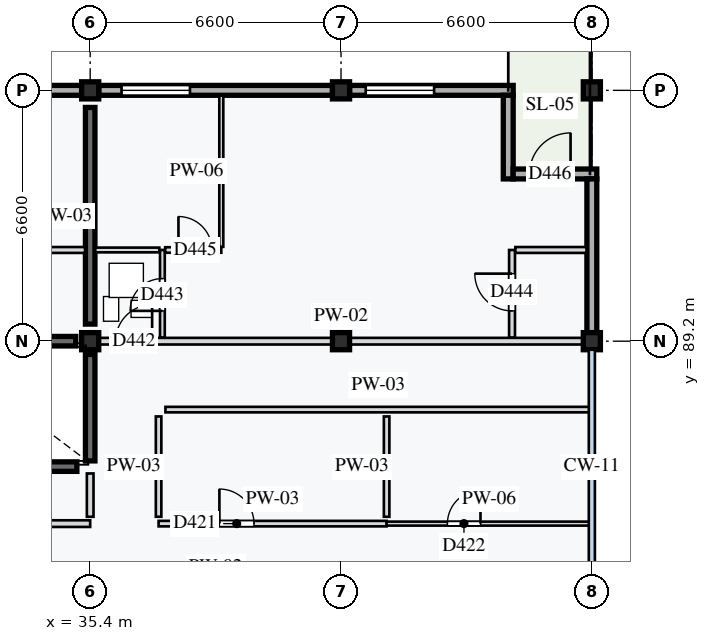
"""IFC4 building model, lengths in metres.
Left out: names, types, materials, properties, quantities, classifications, styles, units other than length and angle.
Written with IfcOpenShell. Run it as: python <this file> out.ifc"""

import sys

from ifc_helpers import new_model, si_unit, direction, frame, frame_2d, origin, origin_2d, place, context, subcontext, project, spatial, rectangle, extrude, element, fill, save


model = new_model("IFC4")
c1 = context("Model", 3, precision=1e-05, world=origin(), true_north=direction((0.0, 1.0)))
c2 = subcontext(c1, "Body", "Model", "MODEL_VIEW")
j1 = project(units=[si_unit("LENGTHUNIT", "METRE"), si_unit("PLANEANGLEUNIT", "RADIAN")], contexts=[c1])
p1 = place(None, origin())
s1 = spatial("IfcSite", under=j1, at=p1, CompositionType="ELEMENT")
p2 = place(p1, origin())
s2 = spatial("IfcBuilding", under=s1, at=p2, CompositionType="ELEMENT")
p3 = place(p2, frame((0.0, 0.0, 43.6)))
s3 = spatial("IfcBuildingStorey", under=s2, at=p3, CompositionType="ELEMENT", Elevation=43.6)
for number, where, z_axis, x_axis in (
    (1, (35.4, 89.2, 0.0), (0.0, 0.0, 1.0), (1.0, 0.0, 0.0)),
    (2, (35.4, 95.8, 0.0), (0.0, 0.0, 1.0), (1.0, 0.0, 0.0)),
    (3, (42.0, 89.2, 0.0), (0.0, 0.0, 1.0), (1.0, 0.0, 0.0)),
    (4, (42.0, 95.8, 0.0), (0.0, 0.0, 1.0), (1.0, 0.0, 0.0)),
    (5, (48.6, 89.2, 0.0), (0.0, 0.0, 1.0), (1.0, 0.0, 0.0)),
    (6, (48.6, 95.8, 0.0), (0.0, 0.0, 1.0), (1.0, 0.0, 0.0)),
):
    element("IfcColumn", number, at=place(p3, frame(where, z_axis=z_axis, x_axis=x_axis)), inside=s3, PredefinedType="COLUMN", context=c2, shape_type="SweptSolid", body=[
        extrude(rectangle(XDim=0.45, YDim=0.45, at=origin_2d()), origin(), (0.0, 0.0, 1.0), 3.2),
    ])
p4 = place(p3, frame((29.18, 89.2, 0.0), z_axis=(0.0, 0.0, 1.0), x_axis=(1.0, 0.0, 0.0)))
e7 = element("IfcWall", 7, at=p4, inside=s3, PredefinedType="SHEAR", context=c2, shape_type="SweptSolid", body=[
    extrude(rectangle(XDim=5.84, YDim=0.25, at=frame_2d((2.92, 0.0))), origin(), (0.0, 0.0, 1.0), 2.98),
])
for number, where, z_axis, x_axis in (
    (8, (32.25, 85.9, 0.0), (0.0, 0.0, 1.0), (1.0, 0.0, 0.0)),
    (9, (35.4, 86.05, 0.0), (0.0, 0.0, 1.0), (0.0, 1.0, 0.0)),
):
    element("IfcWall", number, at=place(p3, frame(where, z_axis=z_axis, x_axis=x_axis)), inside=s3, PredefinedType="SHEAR", context=c2, shape_type="SweptSolid", body=[
        extrude(rectangle(XDim=2.8, YDim=0.25, at=frame_2d((1.4, 0.0))), origin(), (0.0, 0.0, 1.0), 2.98),
    ])
p5 = place(p3, frame((35.4, 89.65, 0.0), z_axis=(0.0, 0.0, 1.0), x_axis=(0.0, 1.0, 0.0)))
e10 = element("IfcWall", 10, at=p5, inside=s3, PredefinedType="SHEAR", context=c2, shape_type="SweptSolid", body=[
    extrude(rectangle(XDim=5.7, YDim=0.25, at=frame_2d((2.85, 0.0))), origin(), (0.0, 0.0, 1.0), 2.98),
])
p6 = place(p3, frame((29.025, 95.8, 0.0), z_axis=(0.0, 0.0, 1.0), x_axis=(1.0, 0.0, 0.0)))
e11 = element("IfcWall", 11, at=p6, inside=s3, PredefinedType="STANDARD", context=c2, shape_type="SweptSolid", body=[
    extrude(rectangle(XDim=6.15, YDim=0.26, at=frame_2d((3.075, 0.0))), origin(), (0.0, 0.0, 1.0), 2.6),
])
p7 = place(p6, frame((2.321, 0.0, 0.85)))
e12 = element("IfcOpeningElement", 12, at=p7, cuts=e11, PredefinedType="OPENING", context=c2, shape_type="SweptSolid", body=[
    extrude(rectangle(XDim=2.1, YDim=1.55, at=frame_2d((1.05, 0.775))), frame((0.0, 0.14, 0.0), z_axis=(0.0, -1.0, 0.0), x_axis=(1.0, 0.0, 0.0)), (0.0, 0.0, 1.0), 0.28),
])
p8 = place(p3, frame((35.625, 95.8, 0.0), z_axis=(0.0, 0.0, 1.0), x_axis=(1.0, 0.0, 0.0)))
e13 = element("IfcWall", 13, at=p8, inside=s3, PredefinedType="STANDARD", context=c2, shape_type="SweptSolid", body=[
    extrude(rectangle(XDim=6.15, YDim=0.26, at=frame_2d((3.075, 0.0))), origin(), (0.0, 0.0, 1.0), 2.6),
])
p9 = place(p8, frame((0.6, 0.0, 0.85)))
e14 = element("IfcOpeningElement", 14, at=p9, cuts=e13, PredefinedType="OPENING", context=c2, shape_type="SweptSolid", body=[
    extrude(rectangle(XDim=1.8, YDim=1.35, at=frame_2d((0.9, 0.675))), frame((0.0, 0.14, 0.0), z_axis=(0.0, -1.0, 0.0), x_axis=(1.0, 0.0, 0.0)), (0.0, 0.0, 1.0), 0.28),
])
p10 = place(p3, frame((42.225, 95.8, 0.0), z_axis=(0.0, 0.0, 1.0), x_axis=(1.0, 0.0, 0.0)))
e15 = element("IfcWall", 15, at=p10, inside=s3, PredefinedType="STANDARD", context=c2, shape_type="SweptSolid", body=[
    extrude(rectangle(XDim=4.305, YDim=0.26, at=frame_2d((2.152, 0.0))), origin(), (0.0, 0.0, 1.0), 2.6),
])
p11 = place(p10, frame((0.425, 0.0, 0.85)))
e16 = element("IfcOpeningElement", 16, at=p11, cuts=e15, PredefinedType="OPENING", context=c2, shape_type="SweptSolid", body=[
    extrude(rectangle(XDim=1.8, YDim=1.55, at=frame_2d((0.9, 0.775))), frame((0.0, 0.14, 0.0), z_axis=(0.0, -1.0, 0.0), x_axis=(1.0, 0.0, 0.0)), (0.0, 0.0, 1.0), 0.28),
])
p12 = place(p3, frame((46.4, 95.67, 0.0), z_axis=(0.0, 0.0, 1.0), x_axis=(0.0, -1.0, 0.0)))
e17 = element("IfcWall", 17, at=p12, inside=s3, PredefinedType="STANDARD", context=c2, shape_type="SweptSolid", body=[
    extrude(rectangle(XDim=2.2, YDim=0.26, at=frame_2d((1.1, 0.0))), origin(), (0.0, 0.0, 1.0), 2.98),
])
p13 = place(p3, frame((46.53, 93.6, 0.0), z_axis=(0.0, 0.0, 1.0), x_axis=(1.0, 0.0, 0.0)))
e18 = element("IfcWall", 18, at=p13, inside=s3, PredefinedType="STANDARD", context=c2, shape_type="SweptSolid", body=[
    extrude(rectangle(XDim=2.2, YDim=0.26, at=frame_2d((1.1, 0.0))), origin(), (0.0, 0.0, 1.0), 2.98),
])
p14 = place(p13, frame((0.43, 0.0, 0.0)))
e19 = element("IfcOpeningElement", 19, at=p14, cuts=e18, PredefinedType="OPENING", context=c2, shape_type="SweptSolid", body=[
    extrude(rectangle(XDim=1.08, YDim=2.22, at=frame_2d((0.54, 1.11))), frame((0.0, 0.14, 0.0), z_axis=(0.0, -1.0, 0.0), x_axis=(1.0, 0.0, 0.0)), (0.0, 0.0, 1.0), 0.28),
])
p15 = place(p3, frame((48.6, 89.425, 0.0), z_axis=(0.0, 0.0, 1.0), x_axis=(0.0, 1.0, 0.0)))
e20 = element("IfcWall", 20, at=p15, inside=s3, PredefinedType="STANDARD", context=c2, shape_type="SweptSolid", body=[
    extrude(rectangle(XDim=4.045, YDim=0.26, at=frame_2d((2.022, 0.0))), origin(), (0.0, 0.0, 1.0), 2.65),
])
p16 = place(p3, frame((32.1, 84.4, 0.0), z_axis=(0.0, 0.0, 1.0), x_axis=(1.0, 0.0, 0.0)))
e21 = element("IfcWall", 21, at=p16, inside=s3, PredefinedType="PARTITIONING", context=c2, shape_type="SweptSolid", body=[
    extrude(rectangle(XDim=3.3, YDim=0.175, at=frame_2d((1.65, 0.0))), origin(), (0.0, 0.0, 1.0), 2.98),
])
p17 = place(p16, frame((1.1, 0.0, 0.0)))
e22 = element("IfcOpeningElement", 22, at=p17, cuts=e21, PredefinedType="OPENING", context=c2, shape_type="SweptSolid", body=[
    extrude(rectangle(XDim=0.85, YDim=2.0, at=frame_2d((0.425, 1.0))), frame((0.0, 0.097, 0.0), z_axis=(0.0, -1.0, 0.0), x_axis=(1.0, 0.0, 0.0)), (0.0, 0.0, 1.0), 0.195),
])
p18 = place(p3, frame((35.4, 84.58, 0.0), z_axis=(0.0, 0.0, 1.0), x_axis=(0.0, 1.0, 0.0)))
e23 = element("IfcWall", 23, at=p18, inside=s3, PredefinedType="PARTITIONING", context=c2, shape_type="SweptSolid", body=[
    extrude(rectangle(XDim=1.14, YDim=0.175, at=frame_2d((0.57, 0.0))), origin(), (0.0, 0.0, 1.0), 2.98),
])
p19 = place(p3, frame((37.2, 84.4, 0.0), z_axis=(0.0, 0.0, 1.0), x_axis=(1.0, 0.0, 0.0)))
e24 = element("IfcWall", 24, at=p19, inside=s3, PredefinedType="PARTITIONING", context=c2, shape_type="SweptSolid", body=[
    extrude(rectangle(XDim=6.0, YDim=0.145, at=frame_2d((3.0, 0.0))), origin(), (0.0, 0.0, 1.0), 2.98),
])
p20 = place(p19, frame((1.6, 0.0, 0.0)))
e25 = element("IfcOpeningElement", 25, at=p20, cuts=e24, PredefinedType="OPENING", context=c2, shape_type="SweptSolid", body=[
    extrude(rectangle(XDim=0.91, YDim=2.14, at=frame_2d((0.455, 1.07))), frame((0.0, 0.083, 0.0), z_axis=(0.0, -1.0, 0.0), x_axis=(1.0, 0.0, 0.0)), (0.0, 0.0, 1.0), 0.165),
])
p21 = place(p3, frame((43.2, 84.4, 0.0), z_axis=(0.0, 0.0, 1.0), x_axis=(1.0, 0.0, 0.0)))
e26 = element("IfcWall", 26, at=p21, inside=s3, PredefinedType="PARTITIONING", context=c2, shape_type="SweptSolid", body=[
    extrude(rectangle(XDim=5.4, YDim=0.105, at=frame_2d((2.7, 0.0))), origin(), (0.0, 0.0, 1.0), 2.98),
])
p22 = place(p21, frame((1.6, 0.0, 0.0)))
e27 = element("IfcOpeningElement", 27, at=p22, cuts=e26, PredefinedType="OPENING", context=c2, shape_type="SweptSolid", body=[
    extrude(rectangle(XDim=0.87, YDim=2.08, at=frame_2d((0.435, 1.04))), frame((0.0, 0.062, 0.0), z_axis=(0.0, -1.0, 0.0), x_axis=(1.0, 0.0, 0.0)), (0.0, 0.0, 1.0), 0.125),
])
p23 = place(p3, frame((43.2, 84.58, 0.0), z_axis=(0.0, 0.0, 1.0), x_axis=(0.0, 1.0, 0.0)))
e28 = element("IfcWall", 28, at=p23, inside=s3, PredefinedType="PARTITIONING", context=c2, shape_type="SweptSolid", body=[
    extrude(rectangle(XDim=2.64, YDim=0.145, at=frame_2d((1.32, 0.0))), origin(), (0.0, 0.0, 1.0), 2.98),
])
p24 = place(p3, frame((37.38, 87.4, 0.0), z_axis=(0.0, 0.0, 1.0), x_axis=(1.0, 0.0, 0.0)))
e29 = element("IfcWall", 29, at=p24, inside=s3, PredefinedType="PARTITIONING", context=c2, shape_type="SweptSolid", body=[
    extrude(rectangle(XDim=11.2, YDim=0.145, at=frame_2d((5.6, 0.0))), origin(), (0.0, 0.0, 1.0), 2.98),
])
p25 = place(p3, frame((37.2, 84.58, 0.0), z_axis=(0.0, 0.0, 1.0), x_axis=(0.0, 1.0, 0.0)))
e30 = element("IfcWall", 30, at=p25, inside=s3, PredefinedType="PARTITIONING", context=c2, shape_type="SweptSolid", body=[
    extrude(rectangle(XDim=2.64, YDim=0.145, at=frame_2d((1.32, 0.0))), origin(), (0.0, 0.0, 1.0), 2.98),
])
p26 = place(p3, frame((33.387, 91.6, 0.0), z_axis=(0.0, 0.0, 1.0), x_axis=(1.0, 0.0, 0.0)))
e31 = element("IfcWall", 31, at=p26, inside=s3, PredefinedType="PARTITIONING", context=c2, shape_type="SweptSolid", body=[
    extrude(rectangle(XDim=1.877, YDim=0.155, at=frame_2d((0.939, 0.0))), origin(), (0.0, 0.0, 1.0), 2.98),
])
p27 = place(p3, frame((35.4, 89.2, 0.0), z_axis=(0.0, 0.0, 1.0), x_axis=(1.0, 0.0, 0.0)))
e32 = element("IfcWall", 32, at=p27, inside=s3, PredefinedType="PARTITIONING", context=c2, shape_type="SweptSolid", body=[
    extrude(rectangle(XDim=13.2, YDim=0.175, at=frame_2d((6.6, 0.0))), origin(), (0.0, 0.0, 1.0), 2.7),
])
p28 = place(p27, frame((0.67, 0.0, 0.0)))
e33 = element("IfcOpeningElement", 33, at=p28, cuts=e32, PredefinedType="OPENING", context=c2, shape_type="SweptSolid", body=[
    extrude(rectangle(XDim=0.96, YDim=2.18, at=frame_2d((0.48, 1.09))), frame((0.0, 0.097, 0.0), z_axis=(0.0, -1.0, 0.0), x_axis=(1.0, 0.0, 0.0)), (0.0, 0.0, 1.0), 0.195),
])
p29 = place(p3, frame((37.3, 89.298, 0.0), z_axis=(0.0, 0.0, 1.0), x_axis=(0.0, 1.0, 0.0)))
e34 = element("IfcWall", 34, at=p29, inside=s3, PredefinedType="PARTITIONING", context=c2, shape_type="SweptSolid", body=[
    extrude(rectangle(XDim=2.302, YDim=0.125, at=frame_2d((1.151, 0.0))), origin(), (0.0, 0.0, 1.0), 2.98),
])
p30 = place(p29, frame((0.7, 0.0, 0.0)))
e35 = element("IfcOpeningElement", 35, at=p30, cuts=e34, PredefinedType="OPENING", context=c2, shape_type="SweptSolid", body=[
    extrude(rectangle(XDim=0.85, YDim=2.04, at=frame_2d((0.425, 1.02))), frame((0.0, 0.073, 0.0), z_axis=(0.0, -1.0, 0.0), x_axis=(1.0, 0.0, 0.0)), (0.0, 0.0, 1.0), 0.145),
])
p31 = place(p3, frame((35.535, 91.6, 0.0), z_axis=(0.0, 0.0, 1.0), x_axis=(1.0, 0.0, 0.0)))
e36 = element("IfcWall", 36, at=p31, inside=s3, PredefinedType="PARTITIONING", context=c2, shape_type="SweptSolid", body=[
    extrude(rectangle(XDim=1.685, YDim=0.125, at=frame_2d((0.843, 0.0))), origin(), (0.0, 0.0, 1.0), 2.98),
])
p32 = place(p3, frame((46.5, 89.298, 0.0), z_axis=(0.0, 0.0, 1.0), x_axis=(0.0, 1.0, 0.0)))
e37 = element("IfcWall", 37, at=p32, inside=s3, PredefinedType="PARTITIONING", context=c2, shape_type="SweptSolid", body=[
    extrude(rectangle(XDim=2.302, YDim=0.155, at=frame_2d((1.151, 0.0))), origin(), (0.0, 0.0, 1.0), 2.98),
])
p33 = place(p32, frame((0.7, 0.0, 0.0)))
e38 = element("IfcOpeningElement", 38, at=p33, cuts=e37, PredefinedType="OPENING", context=c2, shape_type="SweptSolid", body=[
    extrude(rectangle(XDim=0.98, YDim=2.12, at=frame_2d((0.49, 1.06))), frame((0.0, 0.087, 0.0), z_axis=(0.0, -1.0, 0.0), x_axis=(1.0, 0.0, 0.0)), (0.0, 0.0, 1.0), 0.175),
])
p34 = place(p3, frame((46.587, 91.6, 0.0), z_axis=(0.0, 0.0, 1.0), x_axis=(1.0, 0.0, 0.0)))
e39 = element("IfcWall", 39, at=p34, inside=s3, PredefinedType="PARTITIONING", context=c2, shape_type="SweptSolid", body=[
    extrude(rectangle(XDim=1.873, YDim=0.155, at=frame_2d((0.936, 0.0))), origin(), (0.0, 0.0, 1.0), 2.98),
])
p35 = place(p3, frame((37.373, 91.6, 0.0), z_axis=(0.0, 0.0, 1.0), x_axis=(1.0, 0.0, 0.0)))
e40 = element("IfcWall", 40, at=p35, inside=s3, PredefinedType="PARTITIONING", context=c2, shape_type="SweptSolid", body=[
    extrude(rectangle(XDim=1.478, YDim=0.145, at=frame_2d((0.739, 0.0))), origin(), (0.0, 0.0, 1.0), 2.98),
])
p36 = place(p35, frame((0.35, 0.0, 0.0)))
e41 = element("IfcOpeningElement", 41, at=p36, cuts=e40, PredefinedType="OPENING", context=c2, shape_type="SweptSolid", body=[
    extrude(rectangle(XDim=0.88, YDim=2.1, at=frame_2d((0.44, 1.05))), frame((0.0, 0.083, 0.0), z_axis=(0.0, -1.0, 0.0), x_axis=(1.0, 0.0, 0.0)), (0.0, 0.0, 1.0), 0.165),
])
p37 = place(p3, frame((38.85, 91.683, 0.0), z_axis=(0.0, 0.0, 1.0), x_axis=(0.0, 1.0, 0.0)))
e42 = element("IfcWall", 42, at=p37, inside=s3, PredefinedType="PARTITIONING", context=c2, shape_type="SweptSolid", body=[
    extrude(rectangle(XDim=3.977, YDim=0.105, at=frame_2d((1.989, 0.0))), origin(), (0.0, 0.0, 1.0), 2.98),
])
p38 = place(p9, origin())
e43 = element("IfcWindow", 43, at=p38, inside=s3, PartitioningType="SINGLE_PANEL", PredefinedType="WINDOW", context=c2, shape_type="SweptSolid", body=[
    extrude(rectangle(XDim=1.8, YDim=1.35, at=frame_2d((0.9, 0.675))), frame((0.0, 0.03, 0.0), z_axis=(0.0, -1.0, 0.0), x_axis=(1.0, 0.0, 0.0)), (0.0, 0.0, 1.0), 0.06),
])
fill(e14, e43)
p39 = place(p11, origin())
e44 = element("IfcWindow", 44, at=p39, inside=s3, PartitioningType="SINGLE_PANEL", PredefinedType="WINDOW", context=c2, shape_type="SweptSolid", body=[
    extrude(rectangle(XDim=1.8, YDim=1.55, at=frame_2d((0.9, 0.775))), frame((0.0, 0.03, 0.0), z_axis=(0.0, -1.0, 0.0), x_axis=(1.0, 0.0, 0.0)), (0.0, 0.0, 1.0), 0.06),
])
fill(e16, e44)
p40 = place(p14, origin())
e45 = element("IfcDoor", 45, at=p40, inside=s3, OperationType="SINGLE_SWING_RIGHT", PredefinedType="DOOR", context=c2, shape_type="SweptSolid", body=[
    extrude(rectangle(XDim=1.08, YDim=2.22, at=frame_2d((0.54, 1.11))), frame((0.0, 0.025, 0.0), z_axis=(0.0, -1.0, 0.0), x_axis=(1.0, 0.0, 0.0)), (0.0, 0.0, 1.0), 0.05),
])
fill(e19, e45)
p41 = place(p20, origin())
e46 = element("IfcDoor", 46, at=p41, inside=s3, OperationType="SINGLE_SWING_LEFT", PredefinedType="DOOR", context=c2, shape_type="SweptSolid", body=[
    extrude(rectangle(XDim=0.91, YDim=2.14, at=frame_2d((0.455, 1.07))), frame((0.0, 0.025, 0.0), z_axis=(0.0, -1.0, 0.0), x_axis=(1.0, 0.0, 0.0)), (0.0, 0.0, 1.0), 0.05),
])
fill(e25, e46)
p42 = place(p22, origin())
e47 = element("IfcDoor", 47, at=p42, inside=s3, OperationType="SINGLE_SWING_RIGHT", PredefinedType="DOOR", context=c2, shape_type="SweptSolid", body=[
    extrude(rectangle(XDim=0.87, YDim=2.08, at=frame_2d((0.435, 1.04))), frame((0.0, 0.025, 0.0), z_axis=(0.0, -1.0, 0.0), x_axis=(1.0, 0.0, 0.0)), (0.0, 0.0, 1.0), 0.05),
])
fill(e27, e47)
p43 = place(p28, origin())
e48 = element("IfcDoor", 48, at=p43, inside=s3, OperationType="SINGLE_SWING_RIGHT", PredefinedType="DOOR", context=c2, shape_type="SweptSolid", body=[
    extrude(rectangle(XDim=0.96, YDim=2.18, at=frame_2d((0.48, 1.09))), frame((0.0, 0.025, 0.0), z_axis=(0.0, -1.0, 0.0), x_axis=(1.0, 0.0, 0.0)), (0.0, 0.0, 1.0), 0.05),
])
fill(e33, e48)
p44 = place(p30, origin())
e49 = element("IfcDoor", 49, at=p44, inside=s3, OperationType="SINGLE_SWING_LEFT", PredefinedType="DOOR", context=c2, shape_type="SweptSolid", body=[
    extrude(rectangle(XDim=0.85, YDim=2.04, at=frame_2d((0.425, 1.02))), frame((0.0, 0.025, 0.0), z_axis=(0.0, -1.0, 0.0), x_axis=(1.0, 0.0, 0.0)), (0.0, 0.0, 1.0), 0.05),
])
fill(e35, e49)
p45 = place(p33, origin())
e50 = element("IfcDoor", 50, at=p45, inside=s3, OperationType="SINGLE_SWING_RIGHT", PredefinedType="DOOR", context=c2, shape_type="SweptSolid", body=[
    extrude(rectangle(XDim=0.98, YDim=2.12, at=frame_2d((0.49, 1.06))), frame((0.0, 0.025, 0.0), z_axis=(0.0, -1.0, 0.0), x_axis=(1.0, 0.0, 0.0)), (0.0, 0.0, 1.0), 0.05),
])
fill(e38, e50)
p46 = place(p36, origin())
e51 = element("IfcDoor", 51, at=p46, inside=s3, OperationType="SINGLE_SWING_LEFT", PredefinedType="DOOR", context=c2, shape_type="SweptSolid", body=[
    extrude(rectangle(XDim=0.88, YDim=2.1, at=frame_2d((0.44, 1.05))), frame((0.0, 0.025, 0.0), z_axis=(0.0, -1.0, 0.0), x_axis=(1.0, 0.0, 0.0)), (0.0, 0.0, 1.0), 0.05),
])
fill(e41, e51)
save(model, sys.argv[1])
